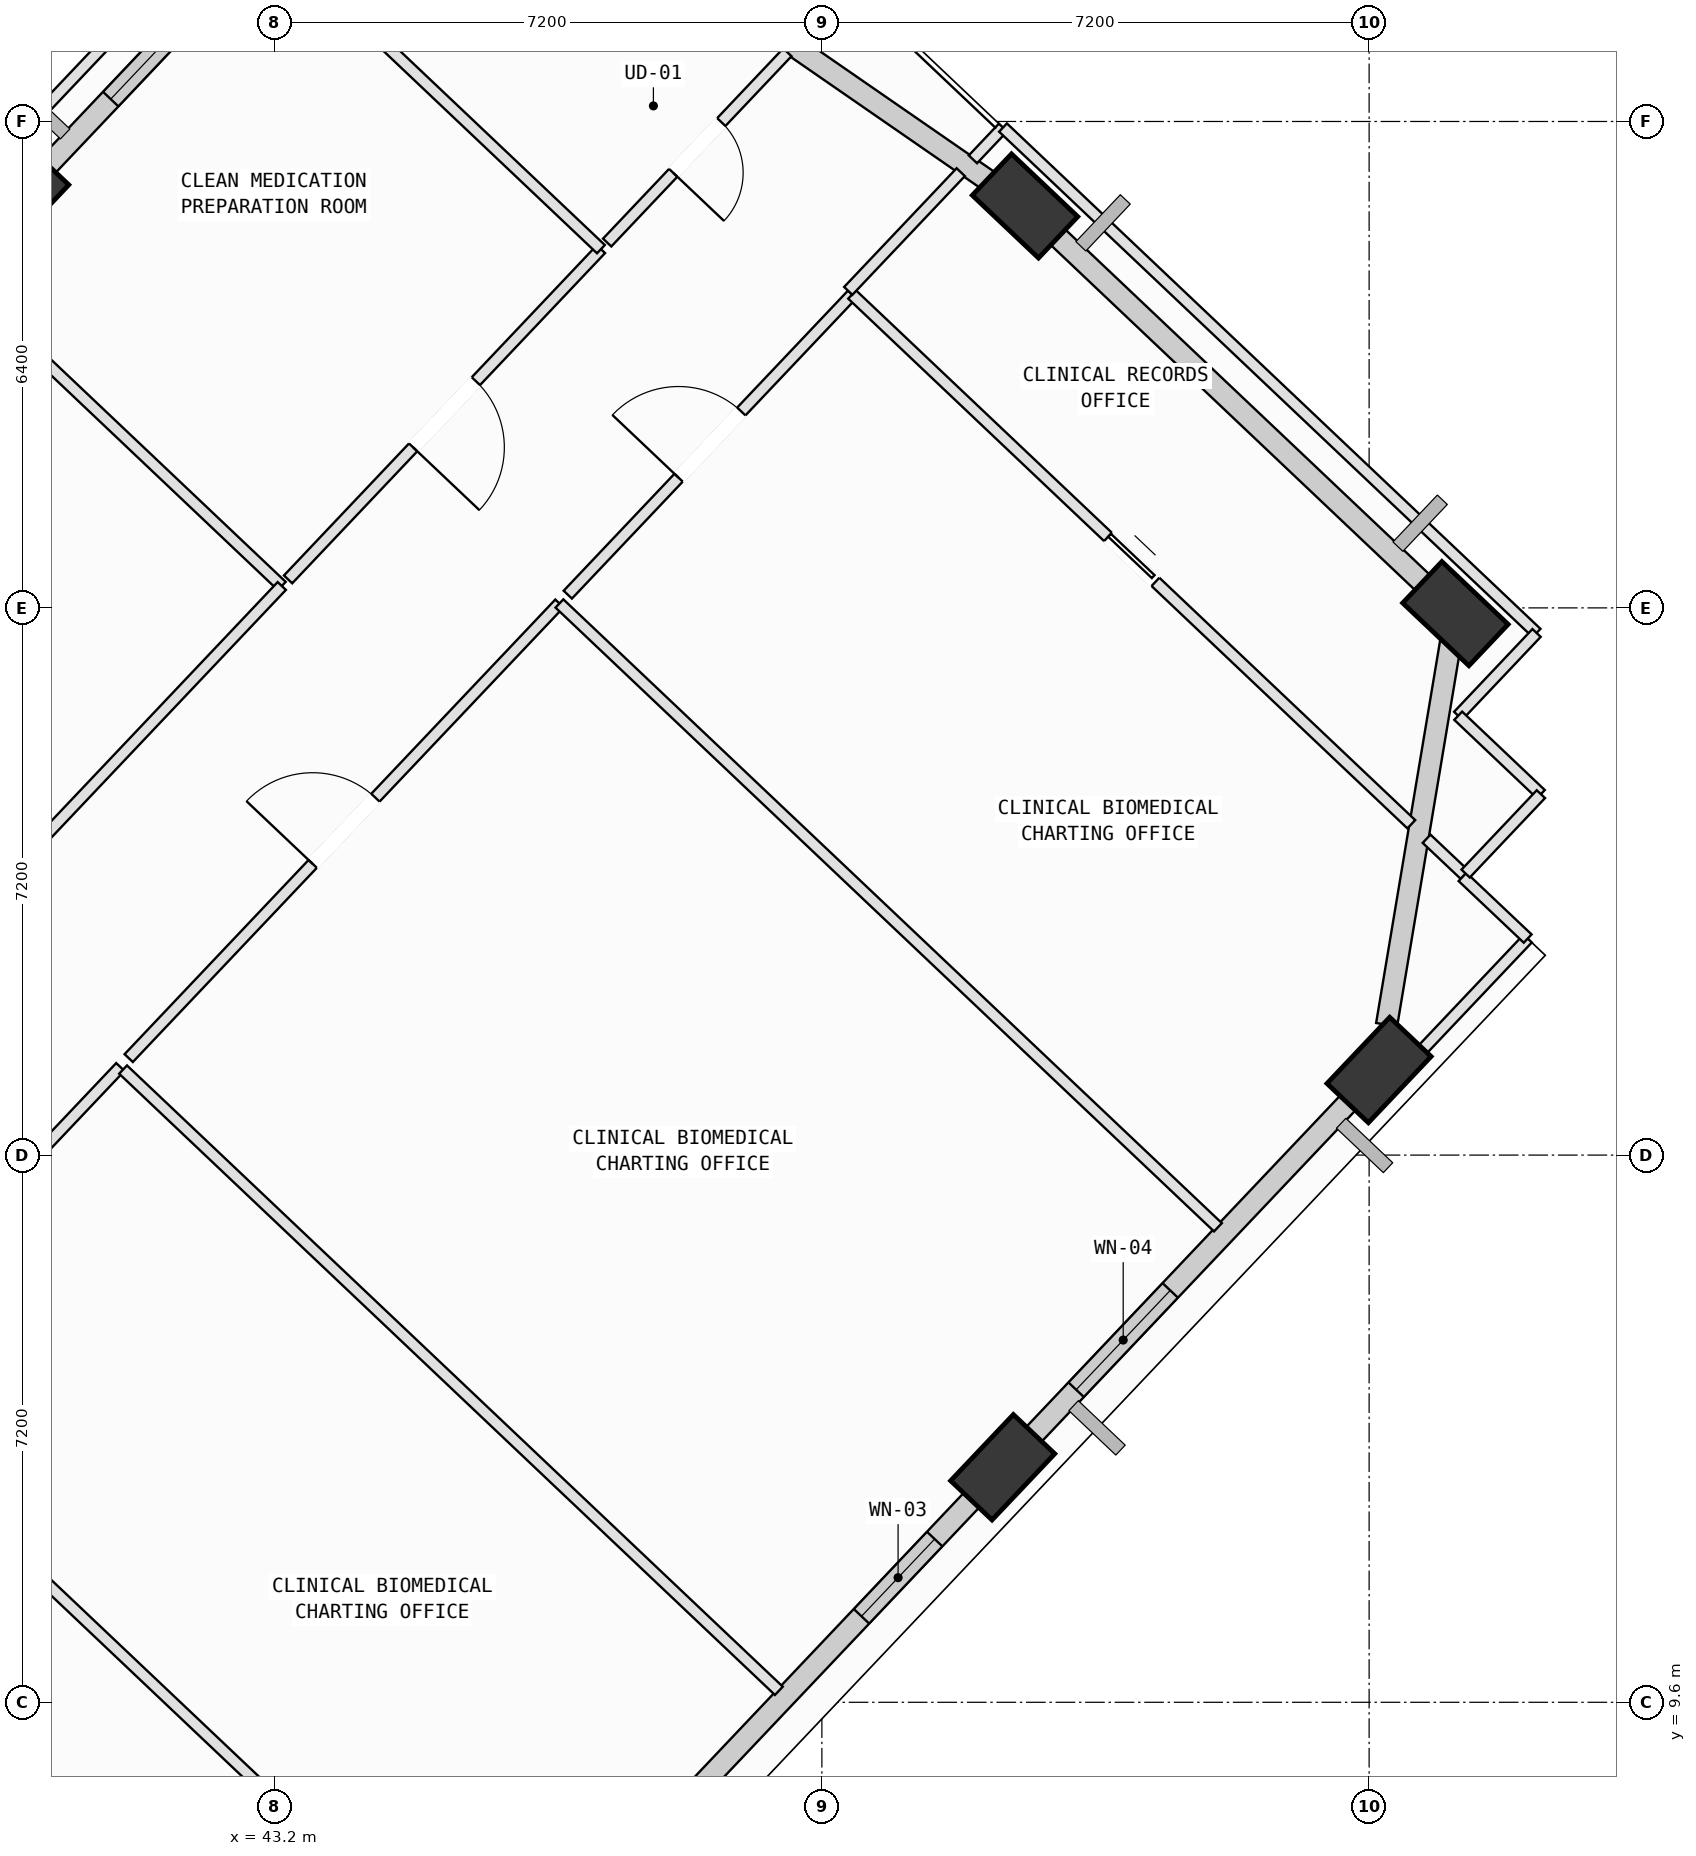
"""IFC4 building model, lengths in metres.
Left out: names, types, materials, properties, quantities, classifications, styles, units other than length and angle.
Written with IfcOpenShell. Run it as: python <this file> out.ifc"""

import sys

from ifc_helpers import new_model, si_unit, direction, frame, frame_2d, origin, origin_2d, place, context, subcontext, project, spatial, rectangle, extrude, element, fill, save


model = new_model("IFC4")
c1 = context("Model", 3, precision=1e-05, world=origin(), true_north=direction((0.0, 1.0)))
c2 = subcontext(c1, "Body", "Model", "MODEL_VIEW")
j1 = project(units=[si_unit("LENGTHUNIT", "METRE"), si_unit("PLANEANGLEUNIT", "RADIAN")], contexts=[c1])
p1 = place(None, origin())
s1 = spatial("IfcSite", under=j1, at=p1, CompositionType="ELEMENT")
p2 = place(p1, origin())
s2 = spatial("IfcBuilding", under=s1, at=p2, CompositionType="ELEMENT")
p3 = place(p2, frame((0.0, 0.0, 223.2)))
s3 = spatial("IfcBuildingStorey", under=s2, at=p3, CompositionType="ELEMENT", Elevation=223.2)
p4 = place(p3, frame((52.779, 12.693, 0.002), z_axis=(0.049327328127, 0.079556282601, 0.99560916659), x_axis=(-0.965366981047, -0.251889794251, 0.067956776377)))
e1 = element("IfcColumn", 1, at=p4, inside=s3, PredefinedType="COLUMN", context=c2, shape_type="SweptSolid", body=[
    extrude(rectangle(XDim=1.2, YDim=0.75, at=origin_2d()), origin(), (0.0, 0.0, 1.0), 4.014),
])
p5 = place(p3, frame((57.73, 17.92, 0.002), z_axis=(0.027586520004, 0.099712509529, 0.994633801636), x_axis=(-0.855360520388, -0.512559421757, 0.075108051033)))
e2 = element("IfcColumn", 2, at=p5, inside=s3, PredefinedType="COLUMN", context=c2, shape_type="SweptSolid", body=[
    extrude(rectangle(XDim=1.2, YDim=0.75, at=origin_2d()), origin(), (0.0, 0.0, 1.0), 4.018),
])
p6 = place(p3, frame((58.735, 23.924, 0.002), z_axis=(0.002795040015, 0.103659527511, 0.994608913145), x_axis=(0.707274223895, -0.703333046982, 0.071314775726)))
e3 = element("IfcColumn", 3, at=p6, inside=s3, PredefinedType="COLUMN", context=c2, shape_type="SweptSolid", body=[
    extrude(rectangle(XDim=1.2, YDim=0.75, at=origin_2d()), origin(), (0.0, 0.0, 1.0), 4.018),
])
p7 = place(p3, frame((53.073, 29.288, 0.002), z_axis=(-0.019177992551, 0.080304038649, 0.996585904967), x_axis=(0.865319764741, -0.497993727643, 0.056779855376)))
e4 = element("IfcColumn", 4, at=p7, inside=s3, PredefinedType="COLUMN", context=c2, shape_type="SweptSolid", body=[
    extrude(rectangle(XDim=1.2, YDim=0.75, at=origin_2d()), origin(), (0.0, 0.0, 1.0), 4.01),
])
p8 = place(p3, frame((52.633, 12.539, 0.0), z_axis=(0.0, 0.0, 1.0), x_axis=(-0.687718222847, -0.725977717264, 0.0)))
e5 = element("IfcWall", 5, at=p8, inside=s3, PredefinedType="SOLIDWALL", context=c2, shape_type="SweptSolid", body=[
    extrude(rectangle(XDim=6.407, YDim=0.28, at=frame_2d((3.203, 0.0))), origin(), (0.0, 0.0, 1.0), 3.265),
])
p9 = place(p8, frame((1.09, 0.0, 0.75)))
e6 = element("IfcOpeningElement", 6, at=p9, cuts=e5, PredefinedType="OPENING", context=c2, shape_type="SweptSolid", body=[
    extrude(rectangle(XDim=1.4, YDim=1.85, at=frame_2d((0.7, 0.925))), frame((0.0, 0.15, 0.0), z_axis=(0.0, -1.0, 0.0), x_axis=(1.0, 0.0, 0.0)), (0.0, 0.0, 1.0), 0.3),
])
p10 = place(p3, frame((57.592, 17.773, 0.0), z_axis=(0.0, 0.0, 1.0), x_axis=(-0.687715105933, -0.725980669902, 0.0)))
e7 = element("IfcWall", 7, at=p10, inside=s3, PredefinedType="SOLIDWALL", context=c2, shape_type="SweptSolid", body=[
    extrude(rectangle(XDim=6.418, YDim=0.28, at=frame_2d((3.209, 0.0))), origin(), (0.0, 0.0, 1.0), 3.265),
])
p11 = place(p10, frame((3.793, 0.0, 0.75)))
e8 = element("IfcOpeningElement", 8, at=p11, cuts=e7, PredefinedType="OPENING", context=c2, shape_type="SweptSolid", body=[
    extrude(rectangle(XDim=1.8, YDim=2.05, at=frame_2d((0.9, 1.025))), frame((0.0, 0.15, 0.0), z_axis=(0.0, -1.0, 0.0), x_axis=(1.0, 0.0, 0.0)), (0.0, 0.0, 1.0), 0.3),
])
p12 = place(p3, frame((58.704, 23.737, 0.0), z_axis=(0.0, 0.0, 1.0), x_axis=(-0.165049562629, -0.986285274085, 0.0)))
e9 = element("IfcWall", 9, at=p12, inside=s3, PredefinedType="SOLIDWALL", context=c2, shape_type="SweptSolid", body=[
    extrude(rectangle(XDim=5.294, YDim=0.28, at=frame_2d((2.647, 0.0))), origin(), (0.0, 0.0, 1.0), 3.265),
])
p13 = place(p3, frame((53.253, 29.117, 0.0), z_axis=(0.0, 0.0, 1.0), x_axis=(0.725973623942, -0.687722543866, 0.0)))
e10 = element("IfcWall", 10, at=p13, inside=s3, PredefinedType="SOLIDWALL", context=c2, shape_type="SweptSolid", body=[
    extrude(rectangle(XDim=7.046, YDim=0.28, at=frame_2d((3.523, 0.0))), origin(), (0.0, 0.0, 1.0), 3.265),
])
p14 = place(p3, frame((45.224, 34.714, 0.0), z_axis=(0.0, 0.0, 1.0), x_axis=(0.82254121979, -0.568705496497, 0.0)))
e11 = element("IfcWall", 11, at=p14, inside=s3, PredefinedType="SOLIDWALL", context=c2, shape_type="SweptSolid", body=[
    extrude(rectangle(XDim=9.036, YDim=0.28, at=frame_2d((4.518, 0.0))), origin(), (0.0, 0.0, 1.0), 3.265),
])
p15 = place(p3, frame((40.084, 29.682, 0.0), z_axis=(0.0, 0.0, 1.0), x_axis=(0.687708690175, 0.72598674744, 0.0)))
e12 = element("IfcWall", 12, at=p15, inside=s3, PredefinedType="SOLIDWALL", context=c2, shape_type="SweptSolid", body=[
    extrude(rectangle(XDim=6.78, YDim=0.28, at=frame_2d((3.39, 0.0))), origin(), (0.0, 0.0, 1.0), 3.165),
])
p16 = place(p15, frame((1.395, 0.0, 0.75)))
e13 = element("IfcOpeningElement", 13, at=p16, cuts=e12, PredefinedType="OPENING", context=c2, shape_type="SweptSolid", body=[
    extrude(rectangle(XDim=1.4, YDim=1.85, at=frame_2d((0.7, 0.925))), frame((0.0, 0.15, 0.0), z_axis=(0.0, -1.0, 0.0), x_axis=(1.0, 0.0, 0.0)), (0.0, 0.0, 1.0), 0.3),
])
p17 = place(p3, frame((37.319, 13.894, 0.0), z_axis=(0.0, 0.0, 1.0), x_axis=(0.725983859035, -0.687711739336, 0.0)))
e14 = element("IfcWall", 14, at=p17, inside=s3, PredefinedType="PARTITIONING", context=c2, shape_type="SweptSolid", body=[
    extrude(rectangle(XDim=11.935, YDim=0.15, at=frame_2d((5.968, 0.0))), origin(), (0.0, 0.0, 1.0), 3.78),
])
p18 = place(p3, frame((37.429, 14.01, 0.0), z_axis=(0.0, 0.0, 1.0), x_axis=(0.687728463974, 0.725968015714, 0.0)))
e15 = element("IfcWall", 15, at=p18, inside=s3, PredefinedType="PARTITIONING", context=c2, shape_type="SweptSolid", body=[
    extrude(rectangle(XDim=5.44, YDim=0.15, at=frame_2d((2.72, 0.0))), origin(), (0.0, 0.0, 1.0), 3.78),
])
p19 = place(p18, frame((2.12, 0.0, 0.0)))
e16 = element("IfcOpeningElement", 16, at=p19, cuts=e15, PredefinedType="OPENING", context=c2, shape_type="SweptSolid", body=[
    extrude(rectangle(XDim=1.2, YDim=2.15, at=frame_2d((0.6, 1.075))), frame((0.0, 0.085, 0.0), z_axis=(0.0, -1.0, 0.0), x_axis=(1.0, 0.0, 0.0)), (0.0, 0.0, 1.0), 0.17),
])
p20 = place(p3, frame((41.206, 17.925, 0.0), z_axis=(0.0, 0.0, 1.0), x_axis=(0.725942427987, -0.687755473442, 0.0)))
e17 = element("IfcWall", 17, at=p20, inside=s3, PredefinedType="PARTITIONING", context=c2, shape_type="SweptSolid", body=[
    extrude(rectangle(XDim=11.885, YDim=0.15, at=frame_2d((5.943, 0.0))), origin(), (0.0, 0.0, 1.0), 3.78),
])
p21 = place(p3, frame((41.28, 18.076, 0.0), z_axis=(0.0, 0.0, 1.0), x_axis=(0.687723280908, 0.725972925732, 0.0)))
e18 = element("IfcWall", 18, at=p21, inside=s3, PredefinedType="PARTITIONING", context=c2, shape_type="SweptSolid", body=[
    extrude(rectangle(XDim=8.24, YDim=0.15, at=frame_2d((4.12, 0.0))), origin(), (0.0, 0.0, 1.0), 3.78),
])
p22 = place(p21, frame((3.52, 0.0, 0.0)))
e19 = element("IfcOpeningElement", 19, at=p22, cuts=e18, PredefinedType="OPENING", context=c2, shape_type="SweptSolid", body=[
    extrude(rectangle(XDim=1.2, YDim=2.15, at=frame_2d((0.6, 1.075))), frame((0.0, 0.085, 0.0), z_axis=(0.0, -1.0, 0.0), x_axis=(1.0, 0.0, 0.0)), (0.0, 0.0, 1.0), 0.17),
])
p23 = place(p3, frame((46.947, 24.058, 0.0), z_axis=(0.0, 0.0, 1.0), x_axis=(0.725954834058, -0.687742378298, 0.0)))
e20 = element("IfcWall", 20, at=p23, inside=s3, PredefinedType="PARTITIONING", context=c2, shape_type="SweptSolid", body=[
    extrude(rectangle(XDim=11.935, YDim=0.15, at=frame_2d((5.967, 0.0))), origin(), (0.0, 0.0, 1.0), 3.78),
])
p24 = place(p3, frame((53.345, 12.955, 0.0), z_axis=(0.0, 0.0, 1.0), x_axis=(-0.687094275741, -0.726568273629, 0.0)))
e21 = element("IfcWall", 21, at=p24, inside=s3, PredefinedType="PARTITIONING", context=c2, shape_type="SweptSolid", body=[
    extrude(rectangle(XDim=0.792, YDim=0.15, at=frame_2d((0.396, 0.0))), origin(), (0.0, 0.0, 1.0), 3.265),
])
p25 = place(p3, frame((59.686, 19.649, 0.0), z_axis=(0.0, 0.0, 1.0), x_axis=(-0.687766399862, -0.725932076175, 0.0)))
e22 = element("IfcWall", 22, at=p25, inside=s3, PredefinedType="PARTITIONING", context=c2, shape_type="SweptSolid", body=[
    extrude(rectangle(XDim=2.802, YDim=0.15, at=frame_2d((1.401, 0.0))), origin(), (0.0, 0.0, 1.0), 3.265),
])
p26 = place(p3, frame((47.057, 24.174, 0.0), z_axis=(0.0, 0.0, 1.0), x_axis=(0.687752117074, 0.725945607783, 0.0)))
e23 = element("IfcWall", 23, at=p26, inside=s3, PredefinedType="PARTITIONING", context=c2, shape_type="SweptSolid", body=[
    extrude(rectangle(XDim=5.44, YDim=0.15, at=frame_2d((2.72, 0.0))), origin(), (0.0, 0.0, 1.0), 3.78),
])
p27 = place(p26, frame((2.12, 0.0, 0.0)))
e24 = element("IfcOpeningElement", 24, at=p27, cuts=e23, PredefinedType="OPENING", context=c2, shape_type="SweptSolid", body=[
    extrude(rectangle(XDim=1.2, YDim=2.15, at=frame_2d((0.6, 1.075))), frame((0.0, 0.085, 0.0), z_axis=(0.0, -1.0, 0.0), x_axis=(1.0, 0.0, 0.0)), (0.0, 0.0, 1.0), 0.17),
])
p28 = place(p3, frame((50.798, 28.123, 0.0), z_axis=(0.0, 0.0, 1.0), x_axis=(0.72594065617, -0.687757343632, 0.0)))
e25 = element("IfcWall", 25, at=p28, inside=s3, PredefinedType="PARTITIONING", context=c2, shape_type="SweptSolid", body=[
    extrude(rectangle(XDim=10.134, YDim=0.15, at=frame_2d((5.067, 0.0))), origin(), (0.0, 0.0, 1.0), 3.78),
])
p29 = place(p28, frame((4.637, 0.0, 0.0)))
e26 = element("IfcOpeningElement", 26, at=p29, cuts=e25, PredefinedType="OPENING", context=c2, shape_type="SweptSolid", body=[
    extrude(rectangle(XDim=0.86, YDim=2.06, at=frame_2d((0.43, 1.03))), frame((0.0, 0.085, 0.0), z_axis=(0.0, -1.0, 0.0), x_axis=(1.0, 0.0, 0.0)), (0.0, 0.0, 1.0), 0.17),
])
p30 = place(p3, frame((58.356, 20.962, 0.0), z_axis=(0.0, 0.0, 1.0), x_axis=(0.726521066113, -0.687144191924, 0.0)))
e27 = element("IfcWall", 27, at=p30, inside=s3, PredefinedType="PARTITIONING", context=c2, shape_type="SweptSolid", body=[
    extrude(rectangle(XDim=0.688, YDim=0.15, at=frame_2d((0.344, 0.0))), origin(), (0.0, 0.0, 1.0), 3.78),
])
p31 = place(p3, frame((58.829, 20.46, 0.0), z_axis=(0.0, 0.0, 1.0), x_axis=(0.72628971039, -0.687388723053, 0.0)))
e28 = element("IfcWall", 28, at=p31, inside=s3, PredefinedType="PARTITIONING", context=c2, shape_type="SweptSolid", body=[
    extrude(rectangle(XDim=1.18, YDim=0.15, at=frame_2d((0.59, 0.0))), origin(), (0.0, 0.0, 1.0), 3.78),
])
p32 = place(p3, frame((38.993, 28.363, 0.0), z_axis=(0.0, 0.0, 1.0), x_axis=(0.725927779308, -0.687770935144, 0.0)))
e29 = element("IfcWall", 29, at=p32, inside=s3, PredefinedType="PARTITIONING", context=c2, shape_type="SweptSolid", body=[
    extrude(rectangle(XDim=5.925, YDim=0.15, at=frame_2d((2.962, 0.0))), origin(), (0.0, 0.0, 1.0), 3.78),
])
p33 = place(p3, frame((43.294, 24.288, 0.0), z_axis=(0.0, 0.0, 1.0), x_axis=(-0.687611091147, -0.726079188058, 0.0)))
e30 = element("IfcWall", 30, at=p33, inside=s3, PredefinedType="PARTITIONING", context=c2, shape_type="SweptSolid", body=[
    extrude(rectangle(XDim=4.969, YDim=0.15, at=frame_2d((2.485, 0.0))), origin(), (0.0, 0.0, 1.0), 3.78),
])
p34 = place(p3, frame((47.493, 28.72, 0.0), z_axis=(0.0, 0.0, 1.0), x_axis=(-0.687716360799, -0.725979481176, 0.0)))
e31 = element("IfcWall", 31, at=p34, inside=s3, PredefinedType="PARTITIONING", context=c2, shape_type="SweptSolid", body=[
    extrude(rectangle(XDim=5.985, YDim=0.15, at=frame_2d((2.992, 0.0))), origin(), (0.0, 0.0, 1.0), 3.78),
])
p35 = place(p34, frame((2.393, 0.0, 0.0)))
e32 = element("IfcOpeningElement", 32, at=p35, cuts=e31, PredefinedType="OPENING", context=c2, shape_type="SweptSolid", body=[
    extrude(rectangle(XDim=1.2, YDim=2.15, at=frame_2d((0.6, 1.075))), frame((0.0, 0.085, 0.0), z_axis=(0.0, -1.0, 0.0), x_axis=(1.0, 0.0, 0.0)), (0.0, 0.0, 1.0), 0.17),
])
p36 = place(p3, frame((38.593, 28.907, 0.0), z_axis=(0.0, 0.0, 1.0), x_axis=(0.687716360799, 0.725979481176, 0.0)))
e33 = element("IfcWall", 33, at=p36, inside=s3, PredefinedType="PARTITIONING", context=c2, shape_type="SweptSolid", body=[
    extrude(rectangle(XDim=5.985, YDim=0.15, at=frame_2d((2.992, 0.0))), origin(), (0.0, 0.0, 1.0), 3.265),
])
p37 = place(p3, frame((43.192, 32.795, 0.0), z_axis=(0.0, 0.0, 1.0), x_axis=(0.725927779308, -0.687770935144, 0.0)))
e34 = element("IfcWall", 34, at=p37, inside=s3, PredefinedType="PARTITIONING", context=c2, shape_type="SweptSolid", body=[
    extrude(rectangle(XDim=5.925, YDim=0.15, at=frame_2d((2.962, 0.0))), origin(), (0.0, 0.0, 1.0), 3.78),
])
p38 = place(p3, frame((49.946, 31.31, 0.0), z_axis=(0.0, 0.0, 1.0), x_axis=(-0.687693581287, -0.726001059405, 0.0)))
e35 = element("IfcWall", 35, at=p38, inside=s3, PredefinedType="PARTITIONING", context=c2, shape_type="SweptSolid", body=[
    extrude(rectangle(XDim=3.448, YDim=0.15, at=frame_2d((1.724, 0.0))), origin(), (0.0, 0.0, 1.0), 3.78),
])
p39 = place(p38, frame((1.264, 0.0, 0.0)))
e36 = element("IfcOpeningElement", 36, at=p39, cuts=e35, PredefinedType="OPENING", context=c2, shape_type="SweptSolid", body=[
    extrude(rectangle(XDim=0.92, YDim=2.1, at=frame_2d((0.46, 1.05))), frame((0.0, 0.085, 0.0), z_axis=(0.0, -1.0, 0.0), x_axis=(1.0, 0.0, 0.0)), (0.0, 0.0, 1.0), 0.17),
])
p40 = place(p3, frame((50.747, 28.171, 0.0), z_axis=(0.0, 0.0, 1.0), x_axis=(0.687788705191, 0.725910942893, 0.0)))
e37 = element("IfcWall", 37, at=p40, inside=s3, PredefinedType="PARTITIONING", context=c2, shape_type="SweptSolid", body=[
    extrude(rectangle(XDim=2.152, YDim=0.15, at=frame_2d((1.076, 0.0))), origin(), (0.0, 0.0, 1.0), 3.78),
])
p41 = place(p3, frame((52.387, 29.902, 0.0), z_axis=(0.0, 0.0, 1.0), x_axis=(0.687768170091, 0.725930399011, 0.0)))
e38 = element("IfcWall", 38, at=p41, inside=s3, PredefinedType="PARTITIONING", context=c2, shape_type="SweptSolid", body=[
    extrude(rectangle(XDim=0.576, YDim=0.15, at=frame_2d((0.288, 0.0))), origin(), (0.0, 0.0, 1.0), 3.78),
])
p42 = place(p3, frame((52.783, 30.32, 0.0), z_axis=(0.0, 0.0, 1.0), x_axis=(0.725973250346, -0.687722938241, 0.0)))
e39 = element("IfcWall", 39, at=p42, inside=s3, PredefinedType="PARTITIONING", context=c2, shape_type="SweptSolid", body=[
    extrude(rectangle(XDim=9.67, YDim=0.15, at=frame_2d((4.835, 0.0))), origin(), (0.0, 0.0, 1.0), 3.265),
])
p43 = place(p3, frame((59.803, 23.67, 0.0), z_axis=(0.0, 0.0, 1.0), x_axis=(-0.687550438625, -0.72613662237, 0.0)))
e40 = element("IfcWall", 40, at=p43, inside=s3, PredefinedType="PARTITIONING", context=c2, shape_type="SweptSolid", body=[
    extrude(rectangle(XDim=1.5, YDim=0.15, at=frame_2d((0.75, 0.0))), origin(), (0.0, 0.0, 1.0), 3.78),
])
p44 = place(p3, frame((58.772, 22.581, 0.0), z_axis=(0.0, 0.0, 1.0), x_axis=(0.725580405267, -0.688137395796, 0.0)))
e41 = element("IfcWall", 41, at=p44, inside=s3, PredefinedType="PARTITIONING", context=c2, shape_type="SweptSolid", body=[
    extrude(rectangle(XDim=1.5, YDim=0.15, at=frame_2d((0.75, 0.0))), origin(), (0.0, 0.0, 1.0), 3.78),
])
p45 = place(p3, frame((59.86, 21.549, 0.0), z_axis=(0.0, 0.0, 1.0), x_axis=(-0.687683494392, -0.726010613931, 0.0)))
e42 = element("IfcWall", 42, at=p45, inside=s3, PredefinedType="PARTITIONING", context=c2, shape_type="SweptSolid", body=[
    extrude(rectangle(XDim=1.44, YDim=0.15, at=frame_2d((0.72, 0.0))), origin(), (0.0, 0.0, 1.0), 3.78),
])
p46 = place(p9, origin())
e43 = element("IfcWindow", 43, at=p46, inside=s3, PartitioningType="SINGLE_PANEL", PredefinedType="WINDOW", context=c2, shape_type="SweptSolid", body=[
    extrude(rectangle(XDim=1.4, YDim=1.85, at=frame_2d((0.7, 0.925))), frame((0.0, 0.03, 0.0), z_axis=(0.0, -1.0, 0.0), x_axis=(1.0, 0.0, 0.0)), (0.0, 0.0, 1.0), 0.06),
])
fill(e6, e43)
p47 = place(p11, origin())
e44 = element("IfcWindow", 44, at=p47, inside=s3, PartitioningType="SINGLE_PANEL", PredefinedType="WINDOW", context=c2, shape_type="SweptSolid", body=[
    extrude(rectangle(XDim=1.8, YDim=2.05, at=frame_2d((0.9, 1.025))), frame((0.0, 0.03, 0.0), z_axis=(0.0, -1.0, 0.0), x_axis=(1.0, 0.0, 0.0)), (0.0, 0.0, 1.0), 0.06),
])
fill(e8, e44)
p48 = place(p16, origin())
e45 = element("IfcWindow", 45, at=p48, inside=s3, PartitioningType="SINGLE_PANEL", PredefinedType="WINDOW", context=c2, shape_type="SweptSolid", body=[
    extrude(rectangle(XDim=1.4, YDim=1.85, at=frame_2d((0.7, 0.925))), frame((0.0, 0.03, 0.0), z_axis=(0.0, -1.0, 0.0), x_axis=(1.0, 0.0, 0.0)), (0.0, 0.0, 1.0), 0.06),
])
fill(e13, e45)
p49 = place(p22, origin())
e46 = element("IfcDoor", 46, at=p49, inside=s3, OperationType="SINGLE_SWING_LEFT", PredefinedType="DOOR", context=c2, shape_type="SweptSolid", body=[
    extrude(rectangle(XDim=1.2, YDim=2.15, at=frame_2d((0.6, 1.075))), frame((0.0, 0.025, 0.0), z_axis=(0.0, -1.0, 0.0), x_axis=(1.0, 0.0, 0.0)), (0.0, 0.0, 1.0), 0.05),
])
fill(e19, e46)
p50 = place(p27, origin())
e47 = element("IfcDoor", 47, at=p50, inside=s3, OperationType="SINGLE_SWING_LEFT", PredefinedType="DOOR", context=c2, shape_type="SweptSolid", body=[
    extrude(rectangle(XDim=1.2, YDim=2.15, at=frame_2d((0.6, 1.075))), frame((0.0, 0.025, 0.0), z_axis=(0.0, -1.0, 0.0), x_axis=(1.0, 0.0, 0.0)), (0.0, 0.0, 1.0), 0.05),
])
fill(e24, e47)
p51 = place(p35, origin())
e48 = element("IfcDoor", 48, at=p51, inside=s3, OperationType="SINGLE_SWING_RIGHT", PredefinedType="DOOR", context=c2, shape_type="SweptSolid", body=[
    extrude(rectangle(XDim=1.2, YDim=2.15, at=frame_2d((0.6, 1.075))), frame((0.0, 0.025, 0.0), z_axis=(0.0, -1.0, 0.0), x_axis=(1.0, 0.0, 0.0)), (0.0, 0.0, 1.0), 0.05),
])
fill(e32, e48)
p52 = place(p39, origin())
e49 = element("IfcDoor", 49, at=p52, inside=s3, OperationType="SINGLE_SWING_RIGHT", PredefinedType="DOOR", context=c2, shape_type="SweptSolid", body=[
    extrude(rectangle(XDim=0.92, YDim=2.1, at=frame_2d((0.46, 1.05))), frame((0.0, 0.025, 0.0), z_axis=(0.0, -1.0, 0.0), x_axis=(1.0, 0.0, 0.0)), (0.0, 0.0, 1.0), 0.05),
])
fill(e36, e49)
p53 = place(p29, origin())
e50 = element("IfcDoor", 50, at=p53, inside=s3, OperationType="SLIDING_TO_LEFT", PredefinedType="DOOR", context=c2, shape_type="SweptSolid", body=[
    extrude(rectangle(XDim=0.86, YDim=2.06, at=frame_2d((0.43, 1.03))), frame((0.0, 0.025, 0.0), z_axis=(0.0, -1.0, 0.0), x_axis=(1.0, 0.0, 0.0)), (0.0, 0.0, 1.0), 0.05),
])
fill(e26, e50)
save(model, sys.argv[1])
